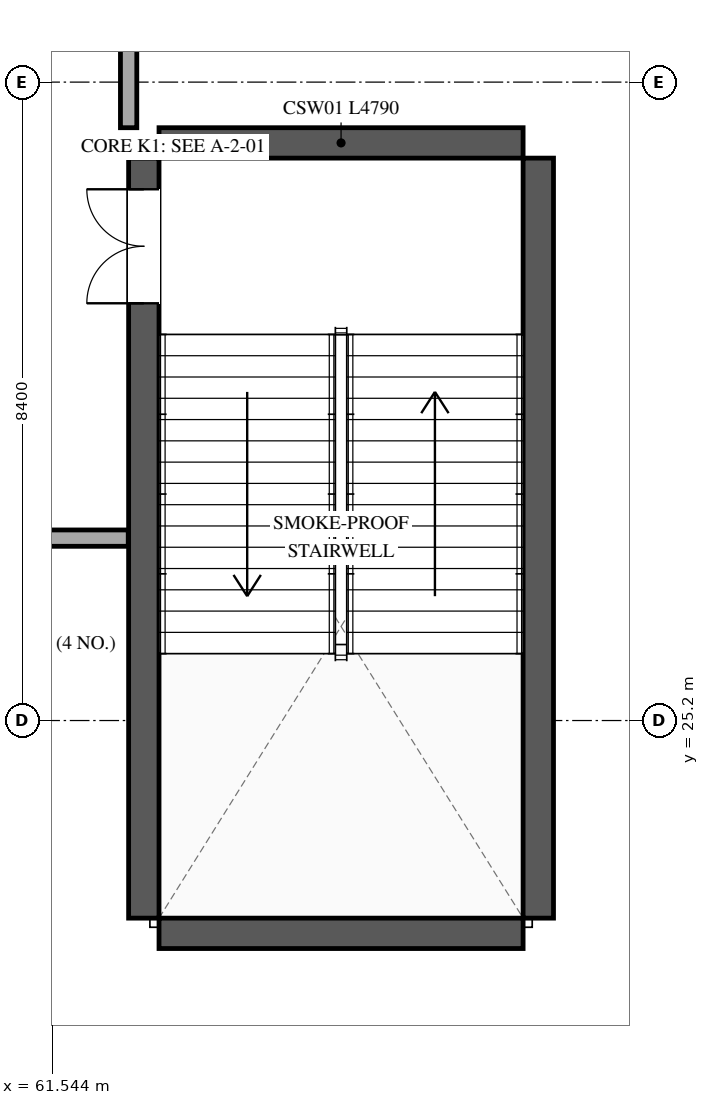
"""IFC4 building model, lengths in metres.
Left out: names, types, materials, properties, quantities, classifications, styles, units other than length and angle.
Written with IfcOpenShell. Run it as: python <this file> out.ifc"""

import sys

from ifc_helpers import new_model, si_unit, direction, frame, frame_2d, origin, place, context, subcontext, project, spatial, rectangle, extrude, element, fill, save


model = new_model("IFC4")
c1 = context("Model", 3, precision=1e-05, world=origin(), true_north=direction((0.0, 1.0)))
c2 = subcontext(c1, "Body", "Model", "MODEL_VIEW")
j1 = project(units=[si_unit("LENGTHUNIT", "METRE"), si_unit("PLANEANGLEUNIT", "RADIAN")], contexts=[c1])
p1 = place(None, origin())
s1 = spatial("IfcSite", under=j1, at=p1, CompositionType="ELEMENT")
p2 = place(p1, origin())
s2 = spatial("IfcBuilding", under=s1, at=p2, CompositionType="ELEMENT")
p3 = place(p2, frame((0.0, 0.0, 31.5)))
s3 = spatial("IfcBuildingStorey", under=s2, at=p3, CompositionType="ELEMENT", Elevation=31.5)
p4 = place(p3, frame((62.75, 22.6, 0.0), z_axis=(0.0, 0.0, 1.0), x_axis=(0.0, 1.0, 0.0)))
e1 = element("IfcWall", 1, at=p4, inside=s3, PredefinedType="SHEAR", context=c2, shape_type="SweptSolid", body=[
    extrude(rectangle(XDim=10.0, YDim=0.4, at=frame_2d((5.0, 0.0))), origin(), (0.0, 0.0, 1.0), 4.8),
])
p5 = place(p4, frame((8.09, 0.0, 0.0)))
e2 = element("IfcOpeningElement", 2, at=p5, cuts=e1, PredefinedType="OPENING", context=c2, shape_type="SweptSolid", body=[
    extrude(rectangle(XDim=1.5, YDim=2.2, at=frame_2d((0.75, 1.1))), frame((0.0, 0.21, 0.0), z_axis=(0.0, -1.0, 0.0), x_axis=(1.0, 0.0, 0.0)), (0.0, 0.0, 1.0), 0.42),
])
p6 = place(p3, frame((67.94, 32.6, 0.0), z_axis=(0.0, 0.0, 1.0), x_axis=(0.0, -1.0, 0.0)))
e3 = element("IfcWall", 3, at=p6, inside=s3, PredefinedType="SHEAR", context=c2, shape_type="SweptSolid", body=[
    extrude(rectangle(XDim=10.0, YDim=0.4, at=frame_2d((5.0, 0.0))), origin(), (0.0, 0.0, 1.0), 4.8),
])
for number, where, z_axis, x_axis in (
    (4, (67.74, 22.4, 0.0), (0.0, 0.0, 1.0), (-1.0, 0.0, 0.0)),
    (5, (62.95, 32.8, 0.0), (0.0, 0.0, 1.0), (1.0, 0.0, 0.0)),
):
    element("IfcWall", number, at=place(p3, frame(where, z_axis=z_axis, x_axis=x_axis)), inside=s3, PredefinedType="SHEAR", context=c2, shape_type="SweptSolid", body=[
        extrude(rectangle(XDim=4.79, YDim=0.4, at=frame_2d((2.395, 0.0))), origin(), (0.0, 0.0, 1.0), 4.8),
    ])
p7 = place(p3, frame((62.545, 27.6, 0.0), z_axis=(0.0, 0.0, 1.0), x_axis=(-1.0, 0.0, 0.0)))
e6 = element("IfcWall", 6, at=p7, inside=s3, PredefinedType="PARTITIONING", context=c2, shape_type="SweptSolid", body=[
    extrude(rectangle(XDim=5.745, YDim=0.215, at=frame_2d((2.873, 0.0))), origin(), (0.0, 0.0, 1.0), 3.76),
])
p8 = place(p3, frame((62.55, 35.0, 0.0), z_axis=(0.0, 0.0, 1.0), x_axis=(0.0, -1.0, 0.0)))
e7 = element("IfcWall", 7, at=p8, inside=s3, PredefinedType="PARTITIONING", context=c2, shape_type="SweptSolid", body=[
    extrude(rectangle(XDim=2.0, YDim=0.215, at=frame_2d((1.0, 0.0))), origin(), (0.0, 0.0, 1.0), 3.76),
])
p9 = place(p5, origin())
e8 = element("IfcDoor", 8, at=p9, inside=s3, OperationType="DOUBLE_DOOR_SINGLE_SWING", PredefinedType="DOOR", context=c2, shape_type="SweptSolid", body=[
    extrude(rectangle(XDim=1.5, YDim=2.2, at=frame_2d((0.75, 1.1))), frame((0.0, 0.025, 0.0), z_axis=(0.0, -1.0, 0.0), x_axis=(1.0, 0.0, 0.0)), (0.0, 0.0, 1.0), 0.05),
])
fill(e2, e8)
save(model, sys.argv[1])
